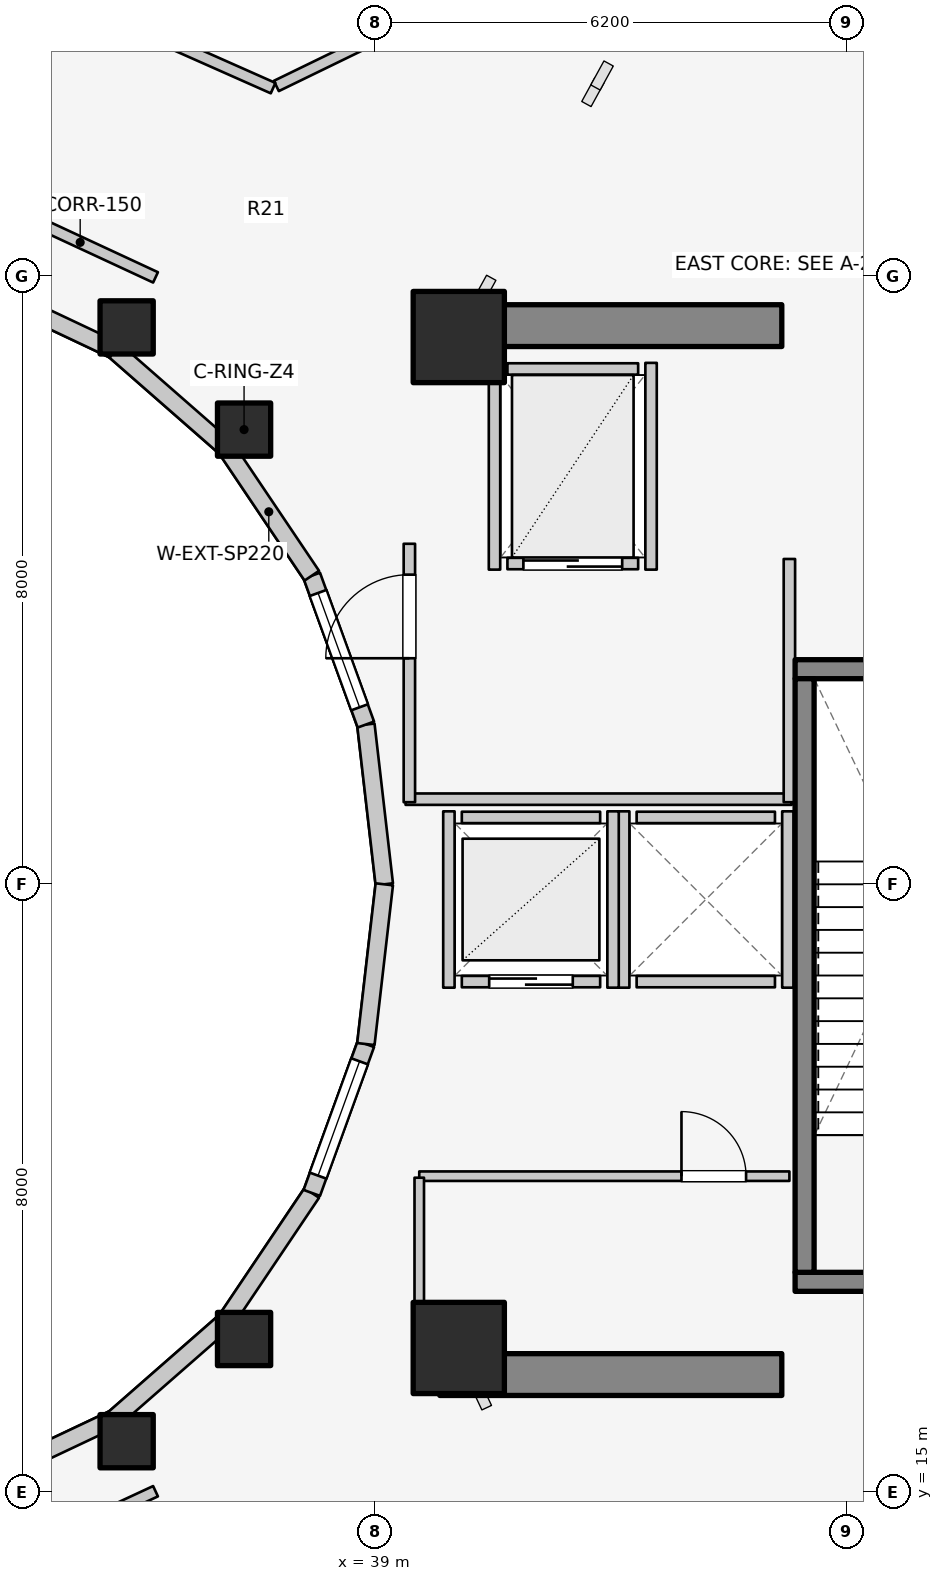
"""IFC4 building model, lengths in metres.
Left out: names, types, materials, properties, quantities, classifications, styles, units other than length and angle.
Written with IfcOpenShell. Run it as: python <this file> out.ifc"""

import sys

from ifc_helpers import new_model, si_unit, direction, frame, frame_2d, origin, origin_2d, place, context, subcontext, project, spatial, rectangle, extrude, element, fill, save


model = new_model("IFC4")
c1 = context("Model", 3, precision=1e-05, world=origin(), true_north=direction((0.0, 1.0)))
c2 = subcontext(c1, "Body", "Model", "MODEL_VIEW")
j1 = project(units=[si_unit("LENGTHUNIT", "METRE"), si_unit("PLANEANGLEUNIT", "RADIAN")], contexts=[c1])
p1 = place(None, origin())
s1 = spatial("IfcSite", under=j1, at=p1, CompositionType="ELEMENT")
p2 = place(p1, origin())
s2 = spatial("IfcBuilding", under=s1, at=p2, CompositionType="ELEMENT")
p3 = place(p2, frame((0.0, 0.0, 193.2)))
s3 = spatial("IfcBuildingStorey", under=s2, at=p3, CompositionType="ELEMENT", Elevation=193.2)
for number, where, z_axis, x_axis in (
    (1, (39.85, 16.55, 0.0), (0.0, 0.0, 1.0), (1.0, 0.0, 0.0)),
    (2, (39.85, 30.35, 0.0), (0.0, 0.0, 1.0), (1.0, 0.0, 0.0)),
):
    element("IfcWall", number, at=place(p3, frame(where, z_axis=z_axis, x_axis=x_axis)), inside=s3, PredefinedType="SHEAR", context=c2, shape_type="SweptSolid", body=[
        extrude(rectangle(XDim=4.5, YDim=0.55, at=frame_2d((2.25, 0.0))), origin(), (0.0, 0.0, 1.0), 4.2),
    ])
p4 = place(p3, frame((44.525, 17.77, 0.0), z_axis=(0.0, 0.0, 1.0), x_axis=(1.0, 0.0, 0.0)))
e3 = element("IfcWall", 3, at=p4, inside=s3, PredefinedType="SOLIDWALL", context=c2, shape_type="SweptSolid", body=[
    extrude(rectangle(XDim=3.37, YDim=0.25, at=frame_2d((1.685, 0.0))), origin(), (0.0, 0.0, 1.0), 4.2),
])
p5 = place(p4, frame((1.135, 0.0, 0.0)))
e4 = element("IfcOpeningElement", 4, at=p5, cuts=e3, PredefinedType="OPENING", context=c2, shape_type="SweptSolid", body=[
    extrude(rectangle(XDim=1.1, YDim=2.1, at=frame_2d((0.55, 1.05))), frame((0.0, 0.135, 0.0), z_axis=(0.0, -1.0, 0.0), x_axis=(1.0, 0.0, 0.0)), (0.0, 0.0, 1.0), 0.27),
])
p6 = place(p3, frame((44.525, 25.83, 0.0), z_axis=(0.0, 0.0, 1.0), x_axis=(1.0, 0.0, 0.0)))
e5 = element("IfcWall", 5, at=p6, inside=s3, PredefinedType="SOLIDWALL", context=c2, shape_type="SweptSolid", body=[
    extrude(rectangle(XDim=3.37, YDim=0.25, at=frame_2d((1.685, 0.0))), origin(), (0.0, 0.0, 1.0), 4.2),
])
p7 = place(p3, frame((44.65, 17.895, 0.0), z_axis=(0.0, 0.0, 1.0), x_axis=(0.0, 1.0, 0.0)))
e6 = element("IfcWall", 6, at=p7, inside=s3, PredefinedType="SOLIDWALL", context=c2, shape_type="SweptSolid", body=[
    extrude(rectangle(XDim=7.81, YDim=0.25, at=frame_2d((3.905, 0.0))), origin(), (0.0, 0.0, 1.0), 4.2),
])
for number, where, z_axis, x_axis in (
    (7, (40.1, 16.9, 0.0), (0.0, 0.0, 1.0), (1.0, 0.0, 0.0)),
    (8, (40.1, 30.2, 0.0), (0.0, 0.0, 1.0), (1.0, 0.0, 0.0)),
):
    element("IfcColumn", number, at=place(p3, frame(where, z_axis=z_axis, x_axis=x_axis)), inside=s3, PredefinedType="COLUMN", context=c2, shape_type="SweptSolid", body=[
        extrude(rectangle(XDim=1.2, YDim=1.2, at=origin_2d()), origin(), (0.0, 0.0, 1.0), 4.2),
    ])
for number, where, z_axis, x_axis in (
    (9, (37.275, 28.982, 0.0), (0.0, 0.0, 1.0), (1.0, 0.0, 0.0)),
    (10, (35.73, 30.327, 0.0), (0.0, 0.0, 1.0), (1.0, 0.0, 0.0)),
    (11, (35.73, 15.673, 0.0), (0.0, 0.0, 1.0), (1.0, 0.0, 0.0)),
    (12, (37.275, 17.018, 0.0), (0.0, 0.0, 1.0), (1.0, 0.0, 0.0)),
):
    element("IfcColumn", number, at=place(p3, frame(where, z_axis=z_axis, x_axis=x_axis)), inside=s3, PredefinedType="COLUMN", context=c2, shape_type="SweptSolid", body=[
        extrude(rectangle(XDim=0.7, YDim=0.7, at=origin_2d()), origin(), (0.0, 0.0, 1.0), 4.2),
    ])
p8 = place(p3, frame((39.12, 23.0, 0.0), z_axis=(0.0, 0.0, 1.0), x_axis=(-0.114711713601, 0.993398823617, 0.0)))
e13 = element("IfcWall", 13, at=p8, inside=s3, PredefinedType="STANDARD", context=c2, shape_type="SweptSolid", body=[
    extrude(rectangle(XDim=2.115, YDim=0.23, at=frame_2d((1.058, 0.0))), origin(), (0.0, 0.0, 1.0), 2.8),
])
p9 = place(p3, frame((38.877, 25.102, 0.0), z_axis=(0.0, 0.0, 1.0), x_axis=(-0.341423187295, 0.93990968033, 0.0)))
e14 = element("IfcWall", 14, at=p9, inside=s3, PredefinedType="STANDARD", context=c2, shape_type="SweptSolid", body=[
    extrude(rectangle(XDim=2.084, YDim=0.23, at=frame_2d((1.042, 0.0))), origin(), (0.0, 0.0, 1.0), 2.8),
])
p10 = place(p9, frame((0.242, 0.0, 0.85)))
e15 = element("IfcOpeningElement", 15, at=p10, cuts=e14, PredefinedType="OPENING", context=c2, shape_type="SweptSolid", body=[
    extrude(rectangle(XDim=1.6, YDim=1.65, at=frame_2d((0.8, 0.825))), frame((0.0, 0.125, 0.0), z_axis=(0.0, -1.0, 0.0), x_axis=(1.0, 0.0, 0.0)), (0.0, 0.0, 1.0), 0.25),
])
p11 = place(p3, frame((38.166, 27.06, 0.0), z_axis=(0.0, 0.0, 1.0), x_axis=(-0.558197800898, 0.829707909492, 0.0)))
e16 = element("IfcWall", 16, at=p11, inside=s3, PredefinedType="STANDARD", context=c2, shape_type="SweptSolid", body=[
    extrude(rectangle(XDim=2.027, YDim=0.23, at=frame_2d((1.013, 0.0))), origin(), (0.0, 0.0, 1.0), 2.32),
])
p12 = place(p3, frame((37.035, 28.742, 0.0), z_axis=(0.0, 0.0, 1.0), x_axis=(-0.752576694707, 0.658504607869, 0.0)))
e17 = element("IfcWall", 17, at=p12, inside=s3, PredefinedType="STANDARD", context=c2, shape_type="SweptSolid", body=[
    extrude(rectangle(XDim=1.959, YDim=0.23, at=frame_2d((0.98, 0.0))), origin(), (0.0, 0.0, 1.0), 2.32),
])
for number, where, z_axis, x_axis in (
    (18, (35.56, 30.032, 0.0), (0.0, 0.0, 1.0), (-0.904, 0.427, 0.0)),
    (19, (33.843, 15.157, 0.0), (0.0, 0.0, 1.0), (0.904, 0.427, 0.0)),
):
    element("IfcWall", number, at=place(p3, frame(where, z_axis=z_axis, x_axis=x_axis)), inside=s3, PredefinedType="STANDARD", context=c2, shape_type="SweptSolid", body=[
        extrude(rectangle(XDim=1.899, YDim=0.23, at=frame_2d((0.95, 0.0))), origin(), (0.0, 0.0, 1.0), 2.32),
    ])
p13 = place(p3, frame((35.56, 15.968, 0.0), z_axis=(0.0, 0.0, 1.0), x_axis=(0.752576694707, 0.658504607869, 0.0)))
e20 = element("IfcWall", 20, at=p13, inside=s3, PredefinedType="STANDARD", context=c2, shape_type="SweptSolid", body=[
    extrude(rectangle(XDim=1.959, YDim=0.23, at=frame_2d((0.98, 0.0))), origin(), (0.0, 0.0, 1.0), 2.32),
])
p14 = place(p3, frame((37.035, 17.258, 0.0), z_axis=(0.0, 0.0, 1.0), x_axis=(0.558197800898, 0.829707909492, 0.0)))
e21 = element("IfcWall", 21, at=p14, inside=s3, PredefinedType="STANDARD", context=c2, shape_type="SweptSolid", body=[
    extrude(rectangle(XDim=2.027, YDim=0.23, at=frame_2d((1.013, 0.0))), origin(), (0.0, 0.0, 1.0), 2.32),
])
p15 = place(p3, frame((38.166, 18.94, 0.0), z_axis=(0.0, 0.0, 1.0), x_axis=(0.341423187295, 0.93990968033, 0.0)))
e22 = element("IfcWall", 22, at=p15, inside=s3, PredefinedType="STANDARD", context=c2, shape_type="SweptSolid", body=[
    extrude(rectangle(XDim=2.084, YDim=0.23, at=frame_2d((1.042, 0.0))), origin(), (0.0, 0.0, 1.0), 2.8),
])
p16 = place(p15, frame((0.242, 0.0, 0.85)))
e23 = element("IfcOpeningElement", 23, at=p16, cuts=e22, PredefinedType="OPENING", context=c2, shape_type="SweptSolid", body=[
    extrude(rectangle(XDim=1.6, YDim=1.65, at=frame_2d((0.8, 0.825))), frame((0.0, 0.125, 0.0), z_axis=(0.0, -1.0, 0.0), x_axis=(1.0, 0.0, 0.0)), (0.0, 0.0, 1.0), 0.25),
])
p17 = place(p3, frame((38.877, 20.898, 0.0), z_axis=(0.0, 0.0, 1.0), x_axis=(0.114711713601, 0.993398823617, 0.0)))
e24 = element("IfcWall", 24, at=p17, inside=s3, PredefinedType="STANDARD", context=c2, shape_type="SweptSolid", body=[
    extrude(rectangle(XDim=2.115, YDim=0.23, at=frame_2d((1.058, 0.0))), origin(), (0.0, 0.0, 1.0), 2.8),
])
for number, where, z_axis, x_axis in (
    (25, (42.44, 21.72, 0.0), (0.0, 0.0, 1.0), (1.0, 0.0, 0.0)),
    (26, (42.44, 23.88, 0.0), (0.0, 0.0, 1.0), (1.0, 0.0, 0.0)),
):
    element("IfcWall", number, at=place(p3, frame(where, z_axis=z_axis, x_axis=x_axis)), inside=s3, PredefinedType="SOLIDWALL", context=c2, shape_type="SweptSolid", body=[
        extrude(rectangle(XDim=1.82, YDim=0.15, at=frame_2d((0.91, 0.0))), origin(), (0.0, 0.0, 1.0), 3.675),
    ])
for number, where, z_axis, x_axis in (
    (27, (42.27, 21.64, 0.0), (0.0, 0.0, 1.0), (0.0, 1.0, 0.0)),
    (28, (44.43, 21.64, 0.0), (0.0, 0.0, 1.0), (0.0, 1.0, 0.0)),
):
    element("IfcWall", number, at=place(p3, frame(where, z_axis=z_axis, x_axis=x_axis)), inside=s3, PredefinedType="SOLIDWALL", context=c2, shape_type="SweptSolid", body=[
        extrude(rectangle(XDim=2.32, YDim=0.15, at=frame_2d((1.16, 0.0))), origin(), (0.0, 0.0, 1.0), 3.675),
    ])
p18 = place(p3, frame((40.14, 21.72, 0.0), z_axis=(0.0, 0.0, 1.0), x_axis=(1.0, 0.0, 0.0)))
e29 = element("IfcWall", 29, at=p18, inside=s3, PredefinedType="SOLIDWALL", context=c2, shape_type="SweptSolid", body=[
    extrude(rectangle(XDim=1.82, YDim=0.15, at=frame_2d((0.91, 0.0))), origin(), (0.0, 0.0, 1.0), 3.22),
])
p19 = place(p18, frame((0.36, 0.0, 0.0)))
e30 = element("IfcOpeningElement", 30, at=p19, cuts=e29, PredefinedType="OPENING", context=c2, shape_type="SweptSolid", body=[
    extrude(rectangle(XDim=1.1, YDim=2.1, at=frame_2d((0.55, 1.05))), frame((0.0, 0.085, 0.0), z_axis=(0.0, -1.0, 0.0), x_axis=(1.0, 0.0, 0.0)), (0.0, 0.0, 1.0), 0.17),
])
p20 = place(p3, frame((40.14, 23.88, 0.0), z_axis=(0.0, 0.0, 1.0), x_axis=(1.0, 0.0, 0.0)))
e31 = element("IfcWall", 31, at=p20, inside=s3, PredefinedType="SOLIDWALL", context=c2, shape_type="SweptSolid", body=[
    extrude(rectangle(XDim=1.82, YDim=0.15, at=frame_2d((0.91, 0.0))), origin(), (0.0, 0.0, 1.0), 3.22),
])
p21 = place(p3, frame((39.97, 21.64, 0.0), z_axis=(0.0, 0.0, 1.0), x_axis=(0.0, 1.0, 0.0)))
e32 = element("IfcWall", 32, at=p21, inside=s3, PredefinedType="SOLIDWALL", context=c2, shape_type="SweptSolid", body=[
    extrude(rectangle(XDim=2.32, YDim=0.15, at=frame_2d((1.16, 0.0))), origin(), (0.0, 0.0, 1.0), 3.22),
])
p22 = place(p3, frame((42.13, 21.64, 0.0), z_axis=(0.0, 0.0, 1.0), x_axis=(0.0, 1.0, 0.0)))
e33 = element("IfcWall", 33, at=p22, inside=s3, PredefinedType="SOLIDWALL", context=c2, shape_type="SweptSolid", body=[
    extrude(rectangle(XDim=2.32, YDim=0.15, at=frame_2d((1.16, 0.0))), origin(), (0.0, 0.0, 1.0), 3.675),
])
p23 = place(p3, frame((40.74, 27.22, 0.0), z_axis=(0.0, 0.0, 1.0), x_axis=(1.0, 0.0, 0.0)))
e34 = element("IfcWall", 34, at=p23, inside=s3, PredefinedType="SOLIDWALL", context=c2, shape_type="SweptSolid", body=[
    extrude(rectangle(XDim=1.72, YDim=0.15, at=frame_2d((0.86, 0.0))), origin(), (0.0, 0.0, 1.0), 3.675),
])
p24 = place(p23, frame((0.21, 0.0, 0.0)))
e35 = element("IfcOpeningElement", 35, at=p24, cuts=e34, PredefinedType="OPENING", context=c2, shape_type="SweptSolid", body=[
    extrude(rectangle(XDim=1.3, YDim=2.1, at=frame_2d((0.65, 1.05))), frame((0.0, 0.085, 0.0), z_axis=(0.0, -1.0, 0.0), x_axis=(1.0, 0.0, 0.0)), (0.0, 0.0, 1.0), 0.17),
])
p25 = place(p3, frame((40.74, 29.78, 0.0), z_axis=(0.0, 0.0, 1.0), x_axis=(1.0, 0.0, 0.0)))
e36 = element("IfcWall", 36, at=p25, inside=s3, PredefinedType="SOLIDWALL", context=c2, shape_type="SweptSolid", body=[
    extrude(rectangle(XDim=1.72, YDim=0.15, at=frame_2d((0.86, 0.0))), origin(), (0.0, 0.0, 1.0), 3.675),
])
for number, where, z_axis, x_axis in (
    (37, (40.57, 27.14, 0.0), (0.0, 0.0, 1.0), (0.0, 1.0, 0.0)),
    (38, (42.63, 27.14, 0.0), (0.0, 0.0, 1.0), (0.0, 1.0, 0.0)),
):
    element("IfcWall", number, at=place(p3, frame(where, z_axis=z_axis, x_axis=x_axis)), inside=s3, PredefinedType="SOLIDWALL", context=c2, shape_type="SweptSolid", body=[
        extrude(rectangle(XDim=2.72, YDim=0.15, at=frame_2d((1.36, 0.0))), origin(), (0.0, 0.0, 1.0), 3.675),
    ])
p26 = place(p3, frame((39.4, 24.12, 0.0), z_axis=(0.0, 0.0, 1.0), x_axis=(1.0, 0.0, 0.0)))
e39 = element("IfcWall", 39, at=p26, inside=s3, PredefinedType="PARTITIONING", context=c2, shape_type="SweptSolid", body=[
    extrude(rectangle(XDim=5.08, YDim=0.15, at=frame_2d((2.54, 0.0))), origin(), (0.0, 0.0, 1.0), 3.22),
])
p27 = place(p3, frame((44.45, 24.08, 0.0), z_axis=(0.0, 0.0, 1.0), x_axis=(0.0, 1.0, 0.0)))
e40 = element("IfcWall", 40, at=p27, inside=s3, PredefinedType="PARTITIONING", context=c2, shape_type="SweptSolid", body=[
    extrude(rectangle(XDim=3.2, YDim=0.15, at=frame_2d((1.6, 0.0))), origin(), (0.0, 0.0, 1.0), 3.675),
])
p28 = place(p3, frame((39.45, 24.08, 0.0), z_axis=(0.0, 0.0, 1.0), x_axis=(0.0, 1.0, 0.0)))
e41 = element("IfcWall", 41, at=p28, inside=s3, PredefinedType="PARTITIONING", context=c2, shape_type="SweptSolid", body=[
    extrude(rectangle(XDim=3.4, YDim=0.15, at=frame_2d((1.7, 0.0))), origin(), (0.0, 0.0, 1.0), 3.675),
])
p29 = place(p28, frame((1.894, 0.0, 0.0)))
e42 = element("IfcOpeningElement", 42, at=p29, cuts=e41, PredefinedType="OPENING", context=c2, shape_type="SweptSolid", body=[
    extrude(rectangle(XDim=1.1, YDim=2.1, at=frame_2d((0.55, 1.05))), frame((0.0, 0.085, 0.0), z_axis=(0.0, -1.0, 0.0), x_axis=(1.0, 0.0, 0.0)), (0.0, 0.0, 1.0), 0.17),
])
p30 = place(p3, frame((39.58, 19.16, 0.0), z_axis=(0.0, 0.0, 1.0), x_axis=(1.0, 0.0, 0.0)))
e43 = element("IfcWall", 43, at=p30, inside=s3, PredefinedType="PARTITIONING", context=c2, shape_type="SweptSolid", body=[
    extrude(rectangle(XDim=4.87, YDim=0.125, at=frame_2d((2.435, 0.0))), origin(), (0.0, 0.0, 1.0), 3.22),
])
p31 = place(p30, frame((3.45, 0.0, 0.0)))
e44 = element("IfcOpeningElement", 44, at=p31, cuts=e43, PredefinedType="OPENING", context=c2, shape_type="SweptSolid", body=[
    extrude(rectangle(XDim=0.85, YDim=2.05, at=frame_2d((0.425, 1.025))), frame((0.0, 0.073, 0.0), z_axis=(0.0, -1.0, 0.0), x_axis=(1.0, 0.0, 0.0)), (0.0, 0.0, 1.0), 0.145),
])
p32 = place(p3, frame((39.58, 17.1, 0.0), z_axis=(0.0, 0.0, 1.0), x_axis=(0.0, 1.0, 0.0)))
e45 = element("IfcWall", 45, at=p32, inside=s3, PredefinedType="PARTITIONING", context=c2, shape_type="SweptSolid", body=[
    extrude(rectangle(XDim=2.04, YDim=0.125, at=frame_2d((1.02, 0.0))), origin(), (0.0, 0.0, 1.0), 3.052),
])
for number, where, z_axis, x_axis in (
    (46, (36.11, 30.985, 0.0), (0.0, 0.0, 1.0), (-0.907, 0.421, 0.0)),
    (47, (34.127, 14.094, 0.0), (0.0, 0.0, 1.0), (0.907, 0.421, 0.0)),
):
    element("IfcWall", number, at=place(p3, frame(where, z_axis=z_axis, x_axis=x_axis)), inside=s3, PredefinedType="PARTITIONING", context=c2, shape_type="SweptSolid", body=[
        extrude(rectangle(XDim=2.186, YDim=0.15, at=frame_2d((1.093, 0.0))), origin(), (0.0, 0.0, 1.0), 2.32),
    ])
p33 = place(p3, frame((37.699, 33.503, 0.0), z_axis=(0.0, 0.0, 1.0), x_axis=(0.899365131214, 0.437198308273, 0.0)))
e48 = element("IfcWall", 48, at=p33, inside=s3, PredefinedType="PARTITIONING", context=c2, shape_type="SweptSolid", body=[
    extrude(rectangle(XDim=6.365, YDim=0.15, at=frame_2d((3.183, 0.0))), origin(), (0.0, 0.0, 1.0), 2.32),
])
p34 = place(p3, frame((37.657, 33.475, 0.0), z_axis=(0.0, 0.0, 1.0), x_axis=(-0.913989848226, 0.405737054432, 0.0)))
e49 = element("IfcWall", 49, at=p34, inside=s3, PredefinedType="PARTITIONING", context=c2, shape_type="SweptSolid", body=[
    extrude(rectangle(XDim=2.991, YDim=0.15, at=frame_2d((1.496, 0.0))), origin(), (0.0, 0.0, 1.0), 3.196),
])
p35 = place(p10, origin())
e50 = element("IfcWindow", 50, at=p35, inside=s3, PartitioningType="SINGLE_PANEL", PredefinedType="WINDOW", context=c2, shape_type="SweptSolid", body=[
    extrude(rectangle(XDim=1.6, YDim=1.65, at=frame_2d((0.8, 0.825))), frame((0.0, 0.03, 0.0), z_axis=(0.0, -1.0, 0.0), x_axis=(1.0, 0.0, 0.0)), (0.0, 0.0, 1.0), 0.06),
])
fill(e15, e50)
p36 = place(p16, origin())
e51 = element("IfcWindow", 51, at=p36, inside=s3, PartitioningType="SINGLE_PANEL", PredefinedType="WINDOW", context=c2, shape_type="SweptSolid", body=[
    extrude(rectangle(XDim=1.6, YDim=1.65, at=frame_2d((0.8, 0.825))), frame((0.0, 0.03, 0.0), z_axis=(0.0, -1.0, 0.0), x_axis=(1.0, 0.0, 0.0)), (0.0, 0.0, 1.0), 0.06),
])
fill(e23, e51)
p37 = place(p19, origin())
e52 = element("IfcDoor", 52, at=p37, inside=s3, OperationType="DOUBLE_DOOR_SLIDING", PredefinedType="DOOR", context=c2, shape_type="SweptSolid", body=[
    extrude(rectangle(XDim=1.1, YDim=2.1, at=frame_2d((0.55, 1.05))), frame((0.0, 0.025, 0.0), z_axis=(0.0, -1.0, 0.0), x_axis=(1.0, 0.0, 0.0)), (0.0, 0.0, 1.0), 0.05),
])
fill(e30, e52)
p38 = place(p24, origin())
e53 = element("IfcDoor", 53, at=p38, inside=s3, OperationType="DOUBLE_DOOR_SLIDING", PredefinedType="DOOR", context=c2, shape_type="SweptSolid", body=[
    extrude(rectangle(XDim=1.3, YDim=2.1, at=frame_2d((0.65, 1.05))), frame((0.0, 0.025, 0.0), z_axis=(0.0, -1.0, 0.0), x_axis=(1.0, 0.0, 0.0)), (0.0, 0.0, 1.0), 0.05),
])
fill(e35, e53)
p39 = place(p29, origin())
e54 = element("IfcDoor", 54, at=p39, inside=s3, OperationType="SINGLE_SWING_LEFT", PredefinedType="DOOR", context=c2, shape_type="SweptSolid", body=[
    extrude(rectangle(XDim=1.1, YDim=2.1, at=frame_2d((0.55, 1.05))), frame((0.0, 0.025, 0.0), z_axis=(0.0, -1.0, 0.0), x_axis=(1.0, 0.0, 0.0)), (0.0, 0.0, 1.0), 0.05),
])
fill(e42, e54)
p40 = place(p31, origin())
e55 = element("IfcDoor", 55, at=p40, inside=s3, OperationType="SINGLE_SWING_LEFT", PredefinedType="DOOR", context=c2, shape_type="SweptSolid", body=[
    extrude(rectangle(XDim=0.85, YDim=2.05, at=frame_2d((0.425, 1.025))), frame((0.0, 0.025, 0.0), z_axis=(0.0, -1.0, 0.0), x_axis=(1.0, 0.0, 0.0)), (0.0, 0.0, 1.0), 0.05),
])
fill(e44, e55)
save(model, sys.argv[1])
